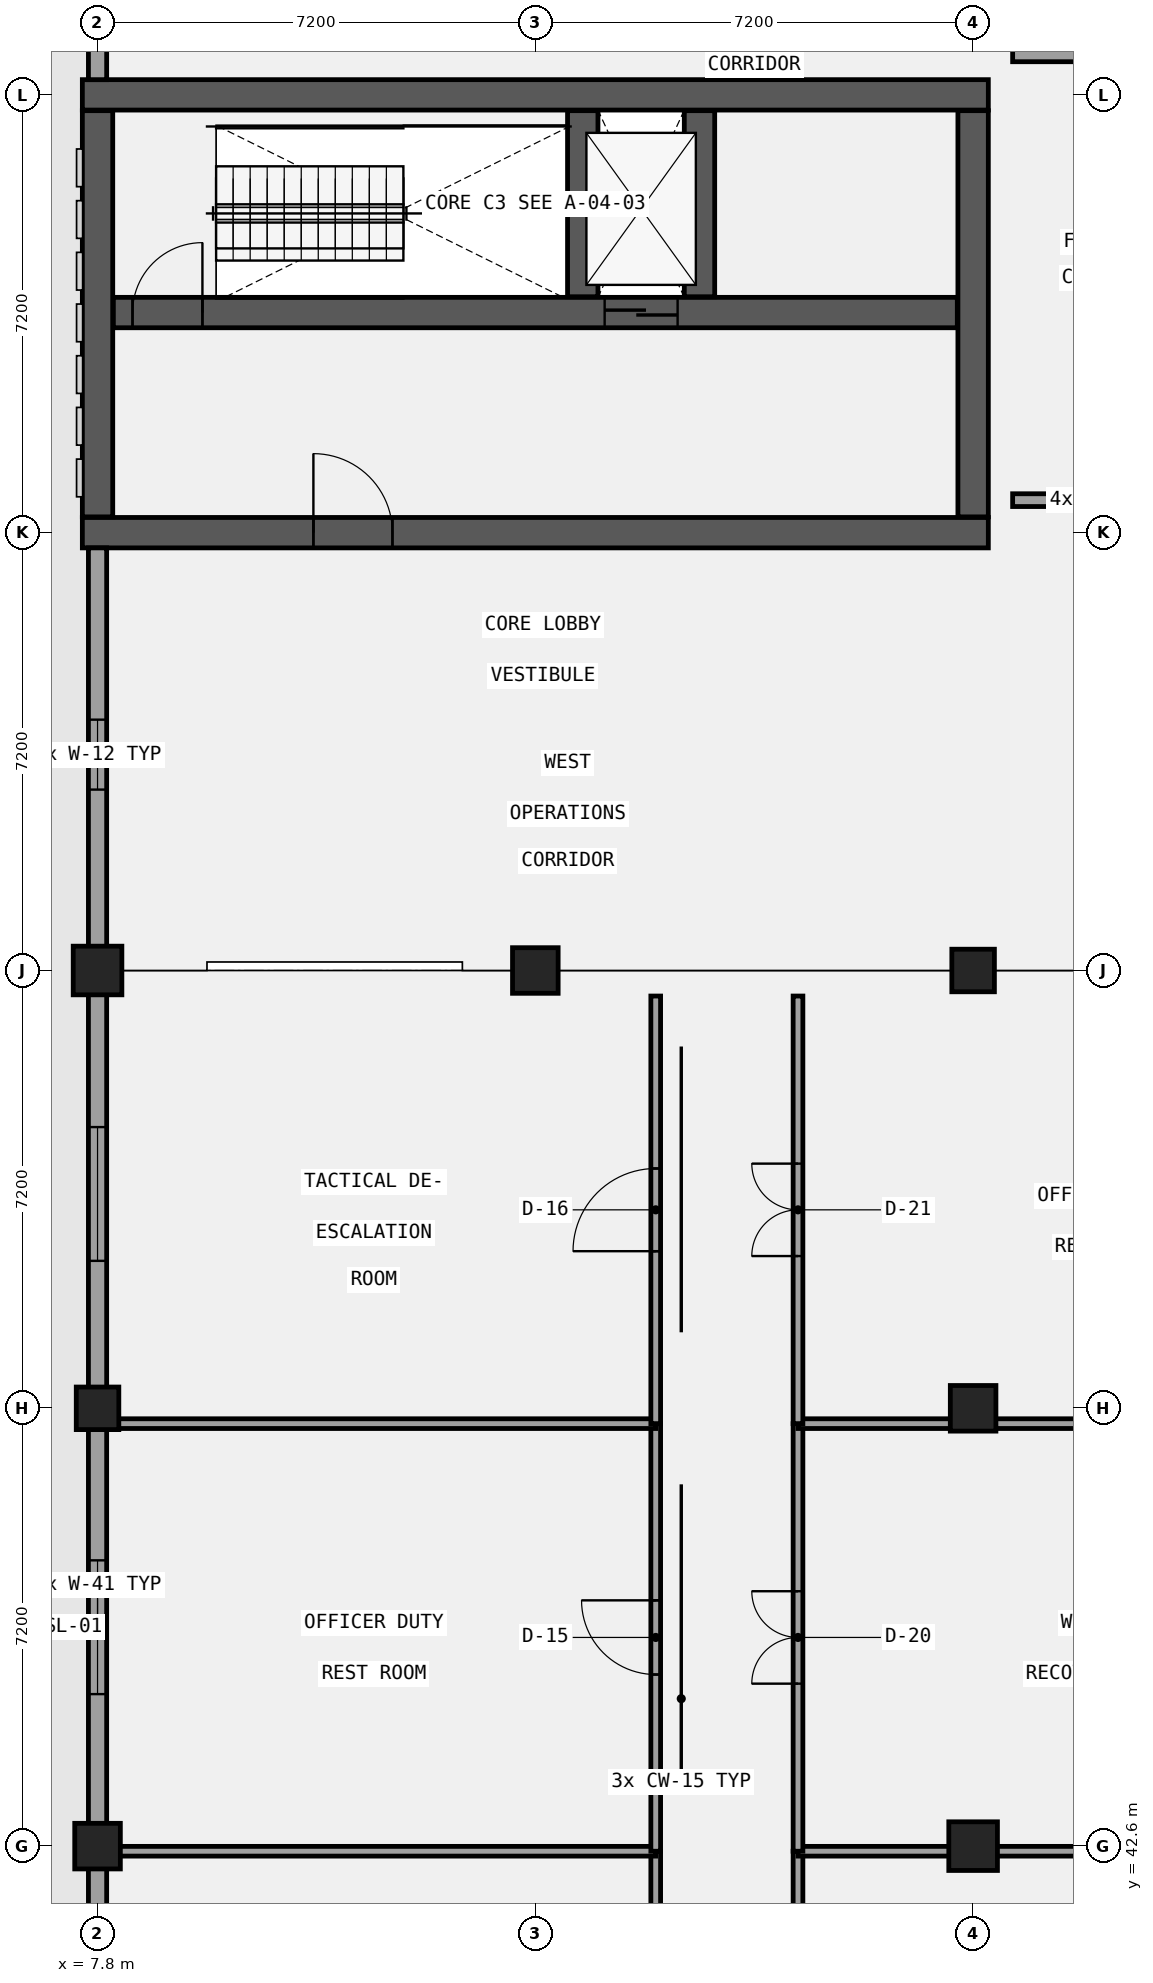
"""IFC4 building model, lengths in metres.
Left out: names, types, materials, properties, quantities, classifications, styles, units other than length and angle.
Written with IfcOpenShell. Run it as: python <this file> out.ifc"""

import sys

from ifc_helpers import new_model, si_unit, direction, frame, frame_2d, origin, origin_2d, place, context, subcontext, project, spatial, rectangle, extrude, element, fill, save


model = new_model("IFC4")
c1 = context("Model", 3, precision=1e-05, world=origin(), true_north=direction((0.0, 1.0)))
c2 = subcontext(c1, "Body", "Model", "MODEL_VIEW")
j1 = project(units=[si_unit("LENGTHUNIT", "METRE"), si_unit("PLANEANGLEUNIT", "RADIAN")], contexts=[c1])
p1 = place(None, origin())
s1 = spatial("IfcSite", under=j1, at=p1, CompositionType="ELEMENT")
p2 = place(p1, origin())
s2 = spatial("IfcBuilding", under=s1, at=p2, CompositionType="ELEMENT")
p3 = place(p2, frame((0.0, 0.0, 5.4)))
s3 = spatial("IfcBuildingStorey", under=s2, at=p3, CompositionType="ELEMENT", Elevation=5.4)
p4 = place(p3, frame((7.55, 71.4, 0.0), z_axis=(0.0, 0.0, 1.0), x_axis=(1.0, 0.0, 0.0)))
e1 = element("IfcWall", 1, at=p4, inside=s3, PredefinedType="SHEAR", context=c2, shape_type="SweptSolid", body=[
    extrude(rectangle(XDim=14.9, YDim=0.5, at=frame_2d((7.45, 0.0))), origin(), (0.0, 0.0, 1.0), 4.2),
])
p5 = place(p3, frame((7.55, 64.2, 0.0), z_axis=(0.0, 0.0, 1.0), x_axis=(1.0, 0.0, 0.0)))
e2 = element("IfcWall", 2, at=p5, inside=s3, PredefinedType="SHEAR", context=c2, shape_type="SweptSolid", body=[
    extrude(rectangle(XDim=14.9, YDim=0.5, at=frame_2d((7.45, 0.0))), origin(), (0.0, 0.0, 1.0), 4.2),
])
p6 = place(p5, frame((3.8, 0.0, 0.0)))
e3 = element("IfcOpeningElement", 3, at=p6, cuts=e2, PredefinedType="OPENING", context=c2, shape_type="SweptSolid", body=[
    extrude(rectangle(XDim=1.3, YDim=2.2, at=frame_2d((0.65, 1.1))), frame((0.0, 0.26, 0.0), z_axis=(0.0, -1.0, 0.0), x_axis=(1.0, 0.0, 0.0)), (0.0, 0.0, 1.0), 0.52),
])
for number, where, z_axis, x_axis in (
    (4, (7.8, 64.46, 0.0), (0.0, 0.0, 1.0), (0.0, 1.0, 0.0)),
    (5, (22.2, 64.46, 0.0), (0.0, 0.0, 1.0), (0.0, 1.0, 0.0)),
):
    element("IfcWall", number, at=place(p3, frame(where, z_axis=z_axis, x_axis=x_axis)), inside=s3, PredefinedType="SHEAR", context=c2, shape_type="SweptSolid", body=[
        extrude(rectangle(XDim=6.68, YDim=0.5, at=frame_2d((3.34, 0.0))), origin(), (0.0, 0.0, 1.0), 4.2),
    ])
p7 = place(p3, frame((8.06, 67.82, 0.0), z_axis=(0.0, 0.0, 1.0), x_axis=(1.0, 0.0, 0.0)))
e6 = element("IfcWall", 6, at=p7, inside=s3, PredefinedType="SHEAR", context=c2, shape_type="SweptSolid", body=[
    extrude(rectangle(XDim=13.88, YDim=0.5, at=frame_2d((6.94, 0.0))), origin(), (0.0, 0.0, 1.0), 4.2),
])
p8 = place(p7, frame((8.08, 0.0, 0.0)))
e7 = element("IfcOpeningElement", 7, at=p8, cuts=e6, PredefinedType="OPENING", context=c2, shape_type="SweptSolid", body=[
    extrude(rectangle(XDim=1.2, YDim=2.15, at=frame_2d((0.6, 1.075))), frame((0.0, 0.26, 0.0), z_axis=(0.0, -1.0, 0.0), x_axis=(1.0, 0.0, 0.0)), (0.0, 0.0, 1.0), 0.52),
])
p9 = place(p7, frame((0.315, 0.0, 0.0)))
e8 = element("IfcOpeningElement", 8, at=p9, cuts=e6, PredefinedType="OPENING", context=c2, shape_type="SweptSolid", body=[
    extrude(rectangle(XDim=1.15, YDim=2.15, at=frame_2d((0.575, 1.075))), frame((0.0, 0.26, 0.0), z_axis=(0.0, -1.0, 0.0), x_axis=(1.0, 0.0, 0.0)), (0.0, 0.0, 1.0), 0.52),
])
for number, where, z_axis, x_axis in (
    (9, (15.78, 68.08, 0.0), (0.0, 0.0, 1.0), (0.0, 1.0, 0.0)),
    (10, (17.7, 68.08, 0.0), (0.0, 0.0, 1.0), (0.0, 1.0, 0.0)),
):
    element("IfcWall", number, at=place(p3, frame(where, z_axis=z_axis, x_axis=x_axis)), inside=s3, PredefinedType="SHEAR", context=c2, shape_type="SweptSolid", body=[
        extrude(rectangle(XDim=3.06, YDim=0.5, at=frame_2d((1.53, 0.0))), origin(), (0.0, 0.0, 1.0), 4.2),
    ])
p10 = place(p3, frame((7.8, 42.6, 0.0), z_axis=(0.0, 0.0, 1.0), x_axis=(1.0, 0.0, 0.0)))
e11 = element("IfcColumn", 11, at=p10, inside=s3, PredefinedType="COLUMN", context=c2, shape_type="SweptSolid", body=[
    extrude(rectangle(XDim=0.75, YDim=0.75, at=origin_2d()), origin(), (0.0, 0.0, 1.0), 4.2),
])
p11 = place(p3, frame((7.8, 49.8, 0.0), z_axis=(0.0, 0.0, 1.0), x_axis=(1.0, 0.0, 0.0)))
e12 = element("IfcColumn", 12, at=p11, inside=s3, PredefinedType="COLUMN", context=c2, shape_type="SweptSolid", body=[
    extrude(rectangle(XDim=0.7, YDim=0.7, at=origin_2d()), origin(), (0.0, 0.0, 1.0), 4.2),
])
p12 = place(p3, frame((7.8, 57.0, 0.0), z_axis=(0.0, 0.0, 1.0), x_axis=(1.0, 0.0, 0.0)))
e13 = element("IfcColumn", 13, at=p12, inside=s3, PredefinedType="COLUMN", context=c2, shape_type="SweptSolid", body=[
    extrude(rectangle(XDim=0.8, YDim=0.8, at=origin_2d()), origin(), (0.0, 0.0, 1.0), 4.2),
])
p13 = place(p3, frame((15.0, 57.0, 0.0), z_axis=(0.0, 0.0, 1.0), x_axis=(1.0, 0.0, 0.0)))
e14 = element("IfcColumn", 14, at=p13, inside=s3, PredefinedType="COLUMN", context=c2, shape_type="SweptSolid", body=[
    extrude(rectangle(XDim=0.75, YDim=0.75, at=origin_2d()), origin(), (0.0, 0.0, 1.0), 4.2),
])
p14 = place(p3, frame((22.2, 42.6, 0.0), z_axis=(0.0, 0.0, 1.0), x_axis=(1.0, 0.0, 0.0)))
e15 = element("IfcColumn", 15, at=p14, inside=s3, PredefinedType="COLUMN", context=c2, shape_type="SweptSolid", body=[
    extrude(rectangle(XDim=0.8, YDim=0.8, at=origin_2d()), origin(), (0.0, 0.0, 1.0), 4.2),
])
p15 = place(p3, frame((22.2, 49.8, 0.0), z_axis=(0.0, 0.0, 1.0), x_axis=(1.0, 0.0, 0.0)))
e16 = element("IfcColumn", 16, at=p15, inside=s3, PredefinedType="COLUMN", context=c2, shape_type="SweptSolid", body=[
    extrude(rectangle(XDim=0.75, YDim=0.75, at=origin_2d()), origin(), (0.0, 0.0, 1.0), 4.2),
])
p16 = place(p3, frame((22.2, 57.0, 0.0), z_axis=(0.0, 0.0, 1.0), x_axis=(1.0, 0.0, 0.0)))
e17 = element("IfcColumn", 17, at=p16, inside=s3, PredefinedType="COLUMN", context=c2, shape_type="SweptSolid", body=[
    extrude(rectangle(XDim=0.7, YDim=0.7, at=origin_2d()), origin(), (0.0, 0.0, 1.0), 4.2),
])
p17 = place(p3, frame((7.8, 78.45, 0.0), z_axis=(0.0, 0.0, 1.0), x_axis=(0.0, -1.0, 0.0)))
e18 = element("IfcWall", 18, at=p17, inside=s3, PredefinedType="SOLIDWALL", context=c2, shape_type="SweptSolid", body=[
    extrude(rectangle(XDim=6.8, YDim=0.3, at=frame_2d((3.4, 0.0))), origin(), (0.0, 0.0, 1.0), 2.92),
])
p18 = place(p17, frame((2.825, 0.0, 1.0)))
e19 = element("IfcOpeningElement", 19, at=p18, cuts=e18, PredefinedType="OPENING", context=c2, shape_type="SweptSolid", body=[
    extrude(rectangle(XDim=1.15, YDim=1.65, at=frame_2d((0.575, 0.825))), frame((0.0, 0.16, 0.0), z_axis=(0.0, -1.0, 0.0), x_axis=(1.0, 0.0, 0.0)), (0.0, 0.0, 1.0), 0.32),
])
p19 = place(p3, frame((7.8, 63.95, 0.0), z_axis=(0.0, 0.0, 1.0), x_axis=(0.0, -1.0, 0.0)))
e20 = element("IfcWall", 20, at=p19, inside=s3, PredefinedType="SOLIDWALL", context=c2, shape_type="SweptSolid", body=[
    extrude(rectangle(XDim=6.8, YDim=0.3, at=frame_2d((3.4, 0.0))), origin(), (0.0, 0.0, 1.0), 3.07),
])
p20 = place(p19, frame((2.825, 0.0, 1.0)))
e21 = element("IfcOpeningElement", 21, at=p20, cuts=e20, PredefinedType="OPENING", context=c2, shape_type="SweptSolid", body=[
    extrude(rectangle(XDim=1.15, YDim=1.65, at=frame_2d((0.575, 0.825))), frame((0.0, 0.16, 0.0), z_axis=(0.0, -1.0, 0.0), x_axis=(1.0, 0.0, 0.0)), (0.0, 0.0, 1.0), 0.32),
])
p21 = place(p3, frame((7.8, 56.85, 0.0), z_axis=(0.0, 0.0, 1.0), x_axis=(0.0, -1.0, 0.0)))
e22 = element("IfcWall", 22, at=p21, inside=s3, PredefinedType="SOLIDWALL", context=c2, shape_type="SweptSolid", body=[
    extrude(rectangle(XDim=35.7, YDim=0.3, at=frame_2d((17.85, 0.0))), origin(), (0.0, 0.0, 1.0), 3.12),
])
p22 = place(p21, frame((31.075, 0.0, 1.0)))
e23 = element("IfcOpeningElement", 23, at=p22, cuts=e22, PredefinedType="OPENING", context=c2, shape_type="SweptSolid", body=[
    extrude(rectangle(XDim=2.2, YDim=1.4, at=frame_2d((1.1, 0.7))), frame((0.0, 0.16, 0.0), z_axis=(0.0, -1.0, 0.0), x_axis=(1.0, 0.0, 0.0)), (0.0, 0.0, 1.0), 0.32),
])
p23 = place(p21, frame((23.95, 0.0, 1.0)))
e24 = element("IfcOpeningElement", 24, at=p23, cuts=e22, PredefinedType="OPENING", context=c2, shape_type="SweptSolid", body=[
    extrude(rectangle(XDim=2.2, YDim=1.4, at=frame_2d((1.1, 0.7))), frame((0.0, 0.16, 0.0), z_axis=(0.0, -1.0, 0.0), x_axis=(1.0, 0.0, 0.0)), (0.0, 0.0, 1.0), 0.32),
])
p24 = place(p21, frame((16.75, 0.0, 1.0)))
e25 = element("IfcOpeningElement", 25, at=p24, cuts=e22, PredefinedType="OPENING", context=c2, shape_type="SweptSolid", body=[
    extrude(rectangle(XDim=2.2, YDim=1.4, at=frame_2d((1.1, 0.7))), frame((0.0, 0.16, 0.0), z_axis=(0.0, -1.0, 0.0), x_axis=(1.0, 0.0, 0.0)), (0.0, 0.0, 1.0), 0.32),
])
p25 = place(p21, frame((9.55, 0.0, 1.0)))
e26 = element("IfcOpeningElement", 26, at=p25, cuts=e22, PredefinedType="OPENING", context=c2, shape_type="SweptSolid", body=[
    extrude(rectangle(XDim=2.2, YDim=1.4, at=frame_2d((1.1, 0.7))), frame((0.0, 0.16, 0.0), z_axis=(0.0, -1.0, 0.0), x_axis=(1.0, 0.0, 0.0)), (0.0, 0.0, 1.0), 0.32),
])
p26 = place(p21, frame((2.425, 0.0, 1.0)))
e27 = element("IfcOpeningElement", 27, at=p26, cuts=e22, PredefinedType="OPENING", context=c2, shape_type="SweptSolid", body=[
    extrude(rectangle(XDim=2.2, YDim=1.4, at=frame_2d((1.1, 0.7))), frame((0.0, 0.16, 0.0), z_axis=(0.0, -1.0, 0.0), x_axis=(1.0, 0.0, 0.0)), (0.0, 0.0, 1.0), 0.32),
])
p27 = place(p3, frame((16.98, 35.484, 0.0), z_axis=(0.0, 0.0, 1.0), x_axis=(0.0, 1.0, 0.0)))
e28 = element("IfcWall", 28, at=p27, inside=s3, PredefinedType="PARTITIONING", context=c2, shape_type="SweptSolid", body=[
    extrude(rectangle(XDim=7.032, YDim=0.16, at=frame_2d((3.516, 0.0))), origin(), (0.0, 0.0, 1.0), 3.92),
])
p28 = place(p27, frame((2.906, 0.0, 0.0)))
e29 = element("IfcOpeningElement", 29, at=p28, cuts=e28, PredefinedType="OPENING", context=c2, shape_type="SweptSolid", body=[
    extrude(rectangle(XDim=1.22, YDim=2.22, at=frame_2d((0.61, 1.11))), frame((0.0, 0.09, 0.0), z_axis=(0.0, -1.0, 0.0), x_axis=(1.0, 0.0, 0.0)), (0.0, 0.0, 1.0), 0.18),
])
p29 = place(p3, frame((7.98, 42.516, 0.0), z_axis=(0.0, 0.0, 1.0), x_axis=(1.0, 0.0, 0.0)))
e30 = element("IfcWall", 30, at=p29, inside=s3, PredefinedType="PARTITIONING", context=c2, shape_type="SweptSolid", body=[
    extrude(rectangle(XDim=9.0, YDim=0.16, at=frame_2d((4.5, 0.0))), origin(), (0.0, 0.0, 1.0), 2.72),
])
p30 = place(p3, frame((16.98, 42.516, 0.0), z_axis=(0.0, 0.0, 1.0), x_axis=(0.0, 1.0, 0.0)))
e31 = element("IfcWall", 31, at=p30, inside=s3, PredefinedType="PARTITIONING", context=c2, shape_type="SweptSolid", body=[
    extrude(rectangle(XDim=7.032, YDim=0.16, at=frame_2d((3.516, 0.0))), origin(), (0.0, 0.0, 1.0), 3.92),
])
p31 = place(p30, frame((2.906, 0.0, 0.0)))
e32 = element("IfcOpeningElement", 32, at=p31, cuts=e31, PredefinedType="OPENING", context=c2, shape_type="SweptSolid", body=[
    extrude(rectangle(XDim=1.22, YDim=2.35, at=frame_2d((0.61, 1.175))), frame((0.0, 0.09, 0.0), z_axis=(0.0, -1.0, 0.0), x_axis=(1.0, 0.0, 0.0)), (0.0, 0.0, 1.0), 0.18),
])
p32 = place(p3, frame((7.98, 49.548, 0.0), z_axis=(0.0, 0.0, 1.0), x_axis=(1.0, 0.0, 0.0)))
e33 = element("IfcWall", 33, at=p32, inside=s3, PredefinedType="PARTITIONING", context=c2, shape_type="SweptSolid", body=[
    extrude(rectangle(XDim=9.0, YDim=0.16, at=frame_2d((4.5, 0.0))), origin(), (0.0, 0.0, 1.0), 2.72),
])
p33 = place(p3, frame((16.98, 49.548, 0.0), z_axis=(0.0, 0.0, 1.0), x_axis=(0.0, 1.0, 0.0)))
e34 = element("IfcWall", 34, at=p33, inside=s3, PredefinedType="PARTITIONING", context=c2, shape_type="SweptSolid", body=[
    extrude(rectangle(XDim=7.032, YDim=0.16, at=frame_2d((3.516, 0.0))), origin(), (0.0, 0.0, 1.0), 3.92),
])
p34 = place(p33, frame((2.836, 0.0, 0.0)))
e35 = element("IfcOpeningElement", 35, at=p34, cuts=e34, PredefinedType="OPENING", context=c2, shape_type="SweptSolid", body=[
    extrude(rectangle(XDim=1.36, YDim=2.1, at=frame_2d((0.68, 1.05))), frame((0.0, 0.09, 0.0), z_axis=(0.0, -1.0, 0.0), x_axis=(1.0, 0.0, 0.0)), (0.0, 0.0, 1.0), 0.18),
])
p35 = place(p3, frame((19.32, 35.484, 0.0), z_axis=(0.0, 0.0, 1.0), x_axis=(0.0, 1.0, 0.0)))
e36 = element("IfcWall", 36, at=p35, inside=s3, PredefinedType="PARTITIONING", context=c2, shape_type="SweptSolid", body=[
    extrude(rectangle(XDim=7.032, YDim=0.16, at=frame_2d((3.516, 0.0))), origin(), (0.0, 0.0, 1.0), 3.92),
])
p36 = place(p35, frame((2.756, 0.0, 0.0)))
e37 = element("IfcOpeningElement", 37, at=p36, cuts=e36, PredefinedType="OPENING", context=c2, shape_type="SweptSolid", body=[
    extrude(rectangle(XDim=1.52, YDim=2.1, at=frame_2d((0.76, 1.05))), frame((0.0, 0.09, 0.0), z_axis=(0.0, -1.0, 0.0), x_axis=(1.0, 0.0, 0.0)), (0.0, 0.0, 1.0), 0.18),
])
p37 = place(p3, frame((19.32, 42.516, 0.0), z_axis=(0.0, 0.0, 1.0), x_axis=(1.0, 0.0, 0.0)))
e38 = element("IfcWall", 38, at=p37, inside=s3, PredefinedType="PARTITIONING", context=c2, shape_type="SweptSolid", body=[
    extrude(rectangle(XDim=9.9, YDim=0.16, at=frame_2d((4.95, 0.0))), origin(), (0.0, 0.0, 1.0), 2.72),
])
p38 = place(p3, frame((19.32, 42.516, 0.0), z_axis=(0.0, 0.0, 1.0), x_axis=(0.0, 1.0, 0.0)))
e39 = element("IfcWall", 39, at=p38, inside=s3, PredefinedType="PARTITIONING", context=c2, shape_type="SweptSolid", body=[
    extrude(rectangle(XDim=7.032, YDim=0.16, at=frame_2d((3.516, 0.0))), origin(), (0.0, 0.0, 1.0), 3.92),
])
p39 = place(p38, frame((2.756, 0.0, 0.0)))
e40 = element("IfcOpeningElement", 40, at=p39, cuts=e39, PredefinedType="OPENING", context=c2, shape_type="SweptSolid", body=[
    extrude(rectangle(XDim=1.52, YDim=2.22, at=frame_2d((0.76, 1.11))), frame((0.0, 0.09, 0.0), z_axis=(0.0, -1.0, 0.0), x_axis=(1.0, 0.0, 0.0)), (0.0, 0.0, 1.0), 0.18),
])
p40 = place(p3, frame((19.32, 49.548, 0.0), z_axis=(0.0, 0.0, 1.0), x_axis=(1.0, 0.0, 0.0)))
e41 = element("IfcWall", 41, at=p40, inside=s3, PredefinedType="PARTITIONING", context=c2, shape_type="SweptSolid", body=[
    extrude(rectangle(XDim=9.9, YDim=0.16, at=frame_2d((4.95, 0.0))), origin(), (0.0, 0.0, 1.0), 2.72),
])
p41 = place(p3, frame((19.32, 49.548, 0.0), z_axis=(0.0, 0.0, 1.0), x_axis=(0.0, 1.0, 0.0)))
e42 = element("IfcWall", 42, at=p41, inside=s3, PredefinedType="PARTITIONING", context=c2, shape_type="SweptSolid", body=[
    extrude(rectangle(XDim=7.032, YDim=0.16, at=frame_2d((3.516, 0.0))), origin(), (0.0, 0.0, 1.0), 3.92),
])
p42 = place(p41, frame((2.756, 0.0, 0.0)))
e43 = element("IfcOpeningElement", 43, at=p42, cuts=e42, PredefinedType="OPENING", context=c2, shape_type="SweptSolid", body=[
    extrude(rectangle(XDim=1.52, YDim=2.35, at=frame_2d((0.76, 1.175))), frame((0.0, 0.09, 0.0), z_axis=(0.0, -1.0, 0.0), x_axis=(1.0, 0.0, 0.0)), (0.0, 0.0, 1.0), 0.18),
])
for number, where, z_axis, x_axis in (
    (44, (22.85, 72.05, 0.0), (0.0, 0.0, 1.0), (1.0, 0.0, 0.0)),
    (45, (22.85, 64.735, 0.0), (0.0, 0.0, 1.0), (1.0, 0.0, 0.0)),
):
    element("IfcWall", number, at=place(p3, frame(where, z_axis=z_axis, x_axis=x_axis)), inside=s3, PredefinedType="PARTITIONING", context=c2, shape_type="SweptSolid", body=[
        extrude(rectangle(XDim=3.51, YDim=0.21, at=frame_2d((1.755, 0.0))), origin(), (0.0, 0.0, 1.0), 3.92),
    ])
p43 = place(p8, frame((1.2, 0.0, 0.0), z_axis=(0.0, 0.0, 1.0), x_axis=(-1.0, 0.0, 0.0)))
e46 = element("IfcDoor", 46, at=p43, inside=s3, OperationType="DOUBLE_DOOR_SLIDING", PredefinedType="DOOR", context=c2, shape_type="SweptSolid", body=[
    extrude(rectangle(XDim=1.2, YDim=2.15, at=frame_2d((0.6, 1.075))), frame((0.0, 0.025, 0.0), z_axis=(0.0, -1.0, 0.0), x_axis=(1.0, 0.0, 0.0)), (0.0, 0.0, 1.0), 0.05),
])
fill(e7, e46)
p44 = place(p9, origin())
e47 = element("IfcDoor", 47, at=p44, inside=s3, OperationType="SINGLE_SWING_RIGHT", PredefinedType="DOOR", context=c2, shape_type="SweptSolid", body=[
    extrude(rectangle(XDim=1.15, YDim=2.15, at=frame_2d((0.575, 1.075))), frame((0.0, 0.025, 0.0), z_axis=(0.0, -1.0, 0.0), x_axis=(1.0, 0.0, 0.0)), (0.0, 0.0, 1.0), 0.05),
])
fill(e8, e47)
p45 = place(p6, frame((1.3, 0.0, 0.0), z_axis=(0.0, 0.0, 1.0), x_axis=(-1.0, 0.0, 0.0)))
e48 = element("IfcDoor", 48, at=p45, inside=s3, OperationType="SINGLE_SWING_LEFT", PredefinedType="DOOR", context=c2, shape_type="SweptSolid", body=[
    extrude(rectangle(XDim=1.3, YDim=2.2, at=frame_2d((0.65, 1.1))), frame((0.0, 0.025, 0.0), z_axis=(0.0, -1.0, 0.0), x_axis=(1.0, 0.0, 0.0)), (0.0, 0.0, 1.0), 0.05),
])
fill(e3, e48)
p46 = place(p20, origin())
e49 = element("IfcWindow", 49, at=p46, inside=s3, PartitioningType="SINGLE_PANEL", PredefinedType="WINDOW", context=c2, shape_type="SweptSolid", body=[
    extrude(rectangle(XDim=1.15, YDim=1.65, at=frame_2d((0.575, 0.825))), frame((0.0, 0.03, 0.0), z_axis=(0.0, -1.0, 0.0), x_axis=(1.0, 0.0, 0.0)), (0.0, 0.0, 1.0), 0.06),
])
fill(e21, e49)
p47 = place(p25, origin())
e50 = element("IfcWindow", 50, at=p47, inside=s3, PartitioningType="SINGLE_PANEL", PredefinedType="WINDOW", context=c2, shape_type="SweptSolid", body=[
    extrude(rectangle(XDim=2.2, YDim=1.4, at=frame_2d((1.1, 0.7))), frame((0.0, 0.03, 0.0), z_axis=(0.0, -1.0, 0.0), x_axis=(1.0, 0.0, 0.0)), (0.0, 0.0, 1.0), 0.06),
])
fill(e26, e50)
p48 = place(p26, origin())
e51 = element("IfcWindow", 51, at=p48, inside=s3, PartitioningType="SINGLE_PANEL", PredefinedType="WINDOW", context=c2, shape_type="SweptSolid", body=[
    extrude(rectangle(XDim=2.2, YDim=1.4, at=frame_2d((1.1, 0.7))), frame((0.0, 0.03, 0.0), z_axis=(0.0, -1.0, 0.0), x_axis=(1.0, 0.0, 0.0)), (0.0, 0.0, 1.0), 0.06),
])
fill(e27, e51)
p49 = place(p31, frame((1.22, 0.0, 0.0), z_axis=(0.0, 0.0, 1.0), x_axis=(-1.0, 0.0, 0.0)))
e52 = element("IfcDoor", 52, at=p49, inside=s3, OperationType="SINGLE_SWING_RIGHT", PredefinedType="DOOR", context=c2, shape_type="SweptSolid", body=[
    extrude(rectangle(XDim=1.22, YDim=2.35, at=frame_2d((0.61, 1.175))), frame((0.0, 0.025, 0.0), z_axis=(0.0, -1.0, 0.0), x_axis=(1.0, 0.0, 0.0)), (0.0, 0.0, 1.0), 0.05),
])
fill(e32, e52)
p50 = place(p34, frame((1.36, 0.0, 0.0), z_axis=(0.0, 0.0, 1.0), x_axis=(-1.0, 0.0, 0.0)))
e53 = element("IfcDoor", 53, at=p50, inside=s3, OperationType="SINGLE_SWING_LEFT", PredefinedType="DOOR", context=c2, shape_type="SweptSolid", body=[
    extrude(rectangle(XDim=1.36, YDim=2.1, at=frame_2d((0.68, 1.05))), frame((0.0, 0.025, 0.0), z_axis=(0.0, -1.0, 0.0), x_axis=(1.0, 0.0, 0.0)), (0.0, 0.0, 1.0), 0.05),
])
fill(e35, e53)
p51 = place(p39, origin())
e54 = element("IfcDoor", 54, at=p51, inside=s3, OperationType="DOUBLE_DOOR_SINGLE_SWING", PredefinedType="DOOR", context=c2, shape_type="SweptSolid", body=[
    extrude(rectangle(XDim=1.52, YDim=2.22, at=frame_2d((0.76, 1.11))), frame((0.0, 0.025, 0.0), z_axis=(0.0, -1.0, 0.0), x_axis=(1.0, 0.0, 0.0)), (0.0, 0.0, 1.0), 0.05),
])
fill(e40, e54)
p52 = place(p42, origin())
e55 = element("IfcDoor", 55, at=p52, inside=s3, OperationType="DOUBLE_DOOR_SINGLE_SWING", PredefinedType="DOOR", context=c2, shape_type="SweptSolid", body=[
    extrude(rectangle(XDim=1.52, YDim=2.35, at=frame_2d((0.76, 1.175))), frame((0.0, 0.025, 0.0), z_axis=(0.0, -1.0, 0.0), x_axis=(1.0, 0.0, 0.0)), (0.0, 0.0, 1.0), 0.05),
])
fill(e43, e55)
save(model, sys.argv[1])
